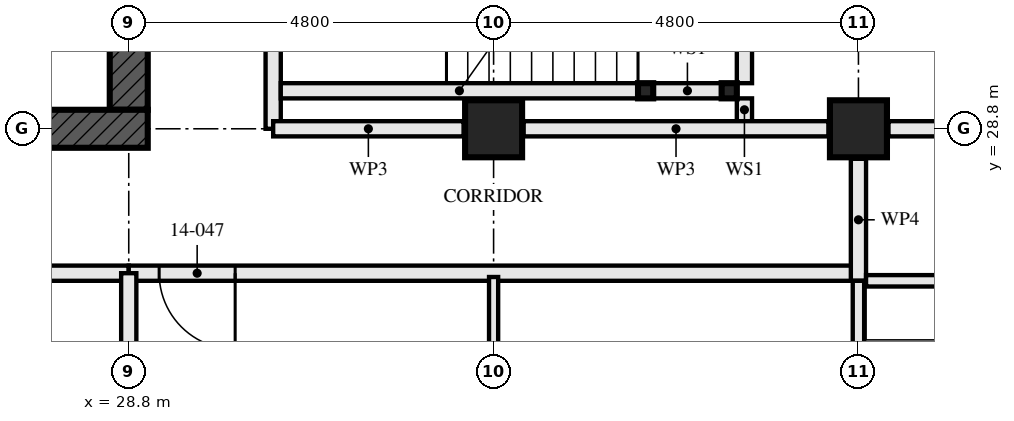
"""IFC4 building model, lengths in metres.
Left out: names, types, materials, properties, quantities, classifications, styles, units other than length and angle.
Written with IfcOpenShell. Run it as: python <this file> out.ifc"""

import sys

from ifc_helpers import new_model, si_unit, direction, frame, frame_2d, origin, origin_2d, place, context, subcontext, project, spatial, rectangle, hollow_rectangle, extrude, element, fill, save


model = new_model("IFC4")
c1 = context("Model", 3, precision=1e-05, world=origin(), true_north=direction((0.0, 1.0)))
c2 = subcontext(c1, "Body", "Model", "MODEL_VIEW")
j1 = project(units=[si_unit("LENGTHUNIT", "METRE"), si_unit("PLANEANGLEUNIT", "RADIAN")], contexts=[c1])
p1 = place(None, origin())
s1 = spatial("IfcSite", under=j1, at=p1, CompositionType="ELEMENT")
p2 = place(p1, origin())
s2 = spatial("IfcBuilding", under=s1, at=p2, CompositionType="ELEMENT")
p3 = place(p2, frame((0.0, 0.0, 55.0)))
s3 = spatial("IfcBuildingStorey", under=s2, at=p3, CompositionType="ELEMENT", Elevation=55.0)
for number, where, z_axis, x_axis in (
    (1, (33.6, 28.8, 0.0), (0.0, 0.0, 1.0), (0.0, 1.0, 0.0)),
    (2, (38.4, 28.8, 0.0), (0.0, 0.0, 1.0), (0.0, 1.0, 0.0)),
):
    element("IfcColumn", number, at=place(p3, frame(where, z_axis=z_axis, x_axis=x_axis)), inside=s3, PredefinedType="COLUMN", context=c2, shape_type="SweptSolid", body=[
        extrude(hollow_rectangle(XDim=0.75, YDim=0.75, WallThickness=0.08, at=origin_2d()), origin(), (0.0, 0.0, 1.0), 3.5),
    ])
p4 = place(p3, frame((14.15, 28.8, -0.17), z_axis=(0.0, 0.0, 1.0), x_axis=(1.0, 0.0, 0.0)))
e3 = element("IfcWall", 3, at=p4, inside=s3, PredefinedType="SHEAR", context=c2, shape_type="SweptSolid", body=[
    extrude(rectangle(XDim=14.9, YDim=0.5, at=frame_2d((7.45, 0.0))), origin(), (0.0, 0.0, 1.0), 3.5),
])
p5 = place(p4, frame((6.85, 0.0, 0.17)))
e4 = element("IfcOpeningElement", 4, at=p5, cuts=e3, PredefinedType="OPENING", context=c2, shape_type="SweptSolid", body=[
    extrude(rectangle(XDim=1.2, YDim=2.1, at=frame_2d((0.6, 1.05))), frame((0.0, 0.26, 0.0), z_axis=(0.0, -1.0, 0.0), x_axis=(1.0, 0.0, 0.0)), (0.0, 0.0, 1.0), 0.521),
])
p6 = place(p3, frame((28.8, 29.05, -0.17), z_axis=(0.0, 0.0, 1.0), x_axis=(0.0, 1.0, 0.0)))
e5 = element("IfcWall", 5, at=p6, inside=s3, PredefinedType="SHEAR", context=c2, shape_type="SweptSolid", body=[
    extrude(rectangle(XDim=13.9, YDim=0.5, at=frame_2d((6.95, 0.0))), origin(), (0.0, 0.0, 1.0), 3.5),
])
p7 = place(p6, frame((6.35, 0.0, 0.17)))
e6 = element("IfcOpeningElement", 6, at=p7, cuts=e5, PredefinedType="OPENING", context=c2, shape_type="SweptSolid", body=[
    extrude(rectangle(XDim=1.2, YDim=2.1, at=frame_2d((0.6, 1.05))), frame((0.0, 0.26, 0.0), z_axis=(0.0, -1.0, 0.0), x_axis=(1.0, 0.0, 0.0)), (0.0, 0.0, 1.0), 0.521),
])
for number, where, z_axis, x_axis in (
    (7, (36.7, 29.3, 0.0), (0.0, 0.0, 1.0), (1.0, 0.0, 0.0)),
    (8, (35.6, 29.3, 0.0), (0.0, 0.0, 1.0), (1.0, 0.0, 0.0)),
):
    element("IfcColumn", number, at=place(p3, frame(where, z_axis=z_axis, x_axis=x_axis)), inside=s3, PredefinedType="COLUMN", context=c2, shape_type="SweptSolid", body=[
        extrude(hollow_rectangle(XDim=0.2, YDim=0.2, WallThickness=0.008, at=origin_2d()), origin(), (0.0, 0.0, 1.0), 3.33),
    ])
p8 = place(p3, frame((14.4, 26.9, 0.0), z_axis=(0.0, 0.0, 1.0), x_axis=(1.0, 0.0, 0.0)))
e9 = element("IfcWall", 9, at=p8, inside=s3, PredefinedType="PARTITIONING", context=c2, shape_type="SweptSolid", body=[
    extrude(rectangle(XDim=14.4, YDim=0.2, at=frame_2d((7.2, 0.0))), origin(), (0.0, 0.0, 1.0), 2.55),
])
p9 = place(p8, frame((1.4, 0.0, 0.0)))
e10 = element("IfcOpeningElement", 10, at=p9, cuts=e9, PredefinedType="OPENING", context=c2, shape_type="SweptSolid", body=[
    extrude(rectangle(XDim=1.0, YDim=2.1, at=frame_2d((0.5, 1.05))), frame((0.0, 0.111, 0.0), z_axis=(0.0, -1.0, 0.0), x_axis=(1.0, 0.0, 0.0)), (0.0, 0.0, 1.0), 0.221),
])
p10 = place(p8, frame((3.65, 0.0, 0.0)))
e11 = element("IfcOpeningElement", 11, at=p10, cuts=e9, PredefinedType="OPENING", context=c2, shape_type="SweptSolid", body=[
    extrude(rectangle(XDim=0.9, YDim=2.1, at=frame_2d((0.45, 1.05))), frame((0.0, 0.111, 0.0), z_axis=(0.0, -1.0, 0.0), x_axis=(1.0, 0.0, 0.0)), (0.0, 0.0, 1.0), 0.221),
])
p11 = place(p8, frame((5.2, 0.0, 0.0)))
e12 = element("IfcOpeningElement", 12, at=p11, cuts=e9, PredefinedType="OPENING", context=c2, shape_type="SweptSolid", body=[
    extrude(rectangle(XDim=1.0, YDim=2.1, at=frame_2d((0.5, 1.05))), frame((0.0, 0.111, 0.0), z_axis=(0.0, -1.0, 0.0), x_axis=(1.0, 0.0, 0.0)), (0.0, 0.0, 1.0), 0.221),
])
p12 = place(p8, frame((10.0, 0.0, 0.0)))
e13 = element("IfcOpeningElement", 13, at=p12, cuts=e9, PredefinedType="OPENING", context=c2, shape_type="SweptSolid", body=[
    extrude(rectangle(XDim=1.0, YDim=2.1, at=frame_2d((0.5, 1.05))), frame((0.0, 0.111, 0.0), z_axis=(0.0, -1.0, 0.0), x_axis=(1.0, 0.0, 0.0)), (0.0, 0.0, 1.0), 0.221),
])
p13 = place(p3, frame((38.4, 23.8, 0.0), z_axis=(0.0, 0.0, 1.0), x_axis=(0.0, 1.0, 0.0)))
e14 = element("IfcWall", 14, at=p13, inside=s3, PredefinedType="PARTITIONING", context=c2, shape_type="SweptSolid", body=[
    extrude(rectangle(XDim=3.0, YDim=0.15, at=frame_2d((1.5, 0.0))), origin(), (0.0, 0.0, 1.0), 2.55),
])
p14 = place(p13, frame((1.05, 0.0, 0.0)))
e15 = element("IfcOpeningElement", 15, at=p14, cuts=e14, PredefinedType="OPENING", context=c2, shape_type="SweptSolid", body=[
    extrude(rectangle(XDim=0.9, YDim=2.1, at=frame_2d((0.45, 1.05))), frame((0.0, 0.085, 0.0), z_axis=(0.0, -1.0, 0.0), x_axis=(1.0, 0.0, 0.0)), (0.0, 0.0, 1.0), 0.171),
])
p15 = place(p3, frame((33.6, 18.6, 0.0), z_axis=(0.0, 0.0, 1.0), x_axis=(0.0, 1.0, 0.0)))
e16 = element("IfcWall", 16, at=p15, inside=s3, PredefinedType="PARTITIONING", context=c2, shape_type="SweptSolid", body=[
    extrude(rectangle(XDim=8.25, YDim=0.12, at=frame_2d((4.125, 0.0))), origin(), (0.0, 0.0, 1.0), 2.55),
])
p16 = place(p15, frame((5.15, 0.0, 0.0)))
e17 = element("IfcOpeningElement", 17, at=p16, cuts=e16, PredefinedType="OPENING", context=c2, shape_type="SweptSolid", body=[
    extrude(rectangle(XDim=0.9, YDim=2.1, at=frame_2d((0.45, 1.05))), frame((0.0, 0.071, 0.0), z_axis=(0.0, -1.0, 0.0), x_axis=(1.0, 0.0, 0.0)), (0.0, 0.0, 1.0), 0.141),
])
p17 = place(p3, frame((28.8, 26.9, 0.0), z_axis=(0.0, 0.0, 1.0), x_axis=(1.0, 0.0, 0.0)))
e18 = element("IfcWall", 18, at=p17, inside=s3, PredefinedType="PARTITIONING", context=c2, shape_type="SweptSolid", body=[
    extrude(rectangle(XDim=9.6, YDim=0.2, at=frame_2d((4.8, 0.0))), origin(), (0.0, 0.0, 1.0), 3.33),
])
p18 = place(p17, frame((0.4, 0.0, 0.0)))
e19 = element("IfcOpeningElement", 19, at=p18, cuts=e18, PredefinedType="OPENING", context=c2, shape_type="SweptSolid", body=[
    extrude(rectangle(XDim=1.0, YDim=2.1, at=frame_2d((0.5, 1.05))), frame((0.0, 0.111, 0.0), z_axis=(0.0, -1.0, 0.0), x_axis=(1.0, 0.0, 0.0)), (0.0, 0.0, 1.0), 0.221),
])
p19 = place(p3, frame((38.4, 26.8, 0.0), z_axis=(0.0, 0.0, 1.0), x_axis=(0.0, 1.0, 0.0)))
e20 = element("IfcWall", 20, at=p19, inside=s3, PredefinedType="PARTITIONING", context=c2, shape_type="SweptSolid", body=[
    extrude(rectangle(XDim=1.605, YDim=0.2, at=frame_2d((0.802, 0.0))), origin(), (0.0, 0.0, 1.0), 3.33),
])
p20 = place(p3, frame((36.6, 29.3, 0.0), z_axis=(0.0, 0.0, 1.0), x_axis=(-1.0, 0.0, 0.0)))
e21 = element("IfcWall", 21, at=p20, inside=s3, PredefinedType="SOLIDWALL", context=c2, shape_type="SweptSolid", body=[
    extrude(rectangle(XDim=0.9, YDim=0.2, at=frame_2d((0.45, 0.0))), origin(), (0.0, 0.0, 1.0), 2.99),
])
p21 = place(p3, frame((35.5, 29.3, 0.0), z_axis=(0.0, 0.0, 1.0), x_axis=(-1.0, 0.0, 0.0)))
e22 = element("IfcWall", 22, at=p21, inside=s3, PredefinedType="SOLIDWALL", context=c2, shape_type="SweptSolid", body=[
    extrude(rectangle(XDim=4.7, YDim=0.2, at=frame_2d((2.35, 0.0))), origin(), (0.0, 0.0, 1.0), 2.99),
])
p22 = place(p3, frame((36.9, 28.9, 0.0), z_axis=(0.0, 0.0, 1.0), x_axis=(0.0, 1.0, 0.0)))
e23 = element("IfcWall", 23, at=p22, inside=s3, PredefinedType="SOLIDWALL", context=c2, shape_type="SweptSolid", body=[
    extrude(rectangle(XDim=0.3, YDim=0.2, at=frame_2d((0.15, 0.0))), origin(), (0.0, 0.0, 1.0), 3.33),
])
p23 = place(p3, frame((36.9, 29.4, 0.0), z_axis=(0.0, 0.0, 1.0), x_axis=(0.0, 1.0, 0.0)))
e24 = element("IfcWall", 24, at=p23, inside=s3, PredefinedType="SOLIDWALL", context=c2, shape_type="SweptSolid", body=[
    extrude(rectangle(XDim=2.6, YDim=0.2, at=frame_2d((1.3, 0.0))), origin(), (0.0, 0.0, 1.0), 3.33),
])
p24 = place(p3, frame((30.7, 28.8, 0.0), z_axis=(0.0, 0.0, 1.0), x_axis=(0.0, 1.0, 0.0)))
e25 = element("IfcWall", 25, at=p24, inside=s3, PredefinedType="PARTITIONING", context=c2, shape_type="SweptSolid", body=[
    extrude(rectangle(XDim=14.4, YDim=0.2, at=frame_2d((7.2, 0.0))), origin(), (0.0, 0.0, 1.0), 2.55),
])
p25 = place(p24, frame((1.4, 0.0, 0.0)))
e26 = element("IfcOpeningElement", 26, at=p25, cuts=e25, PredefinedType="OPENING", context=c2, shape_type="SweptSolid", body=[
    extrude(rectangle(XDim=1.0, YDim=2.1, at=frame_2d((0.5, 1.05))), frame((0.0, 0.111, 0.0), z_axis=(0.0, -1.0, 0.0), x_axis=(1.0, 0.0, 0.0)), (0.0, 0.0, 1.0), 0.221),
])
p26 = place(p24, frame((4.1, 0.0, 0.0)))
e27 = element("IfcOpeningElement", 27, at=p26, cuts=e25, PredefinedType="OPENING", context=c2, shape_type="SweptSolid", body=[
    extrude(rectangle(XDim=1.0, YDim=2.1, at=frame_2d((0.5, 1.05))), frame((0.0, 0.111, 0.0), z_axis=(0.0, -1.0, 0.0), x_axis=(1.0, 0.0, 0.0)), (0.0, 0.0, 1.0), 0.221),
])
p27 = place(p24, frame((5.975, 0.0, 0.0)))
e28 = element("IfcOpeningElement", 28, at=p27, cuts=e25, PredefinedType="OPENING", context=c2, shape_type="SweptSolid", body=[
    extrude(rectangle(XDim=1.0, YDim=2.1, at=frame_2d((0.5, 1.05))), frame((0.0, 0.111, 0.0), z_axis=(0.0, -1.0, 0.0), x_axis=(1.0, 0.0, 0.0)), (0.0, 0.0, 1.0), 0.221),
])
p28 = place(p24, frame((10.0, 0.0, 0.0)))
e29 = element("IfcOpeningElement", 29, at=p28, cuts=e25, PredefinedType="OPENING", context=c2, shape_type="SweptSolid", body=[
    extrude(rectangle(XDim=1.0, YDim=2.1, at=frame_2d((0.5, 1.05))), frame((0.0, 0.111, 0.0), z_axis=(0.0, -1.0, 0.0), x_axis=(1.0, 0.0, 0.0)), (0.0, 0.0, 1.0), 0.221),
])
p29 = place(p3, frame((28.8, 24.395, 0.0), z_axis=(0.0, 0.0, 1.0), x_axis=(0.0, 1.0, 0.0)))
e30 = element("IfcWall", 30, at=p29, inside=s3, PredefinedType="PARTITIONING", context=c2, shape_type="SweptSolid", body=[
    extrude(rectangle(XDim=2.505, YDim=0.2, at=frame_2d((1.252, 0.0))), origin(), (0.0, 0.0, 1.0), 2.32),
])
p30 = place(p3, frame((42.88, 28.8, 0.0), z_axis=(0.0, 0.0, 1.0), x_axis=(-1.0, 0.0, 0.0)))
e31 = element("IfcWall", 31, at=p30, inside=s3, PredefinedType="PARTITIONING", context=c2, shape_type="SweptSolid", body=[
    extrude(rectangle(XDim=4.085, YDim=0.2, at=frame_2d((2.042, 0.0))), origin(), (0.0, 0.0, 1.0), 2.32),
])
p31 = place(p3, frame((38.005, 28.8, 0.0), z_axis=(0.0, 0.0, 1.0), x_axis=(-1.0, 0.0, 0.0)))
e32 = element("IfcWall", 32, at=p31, inside=s3, PredefinedType="PARTITIONING", context=c2, shape_type="SweptSolid", body=[
    extrude(rectangle(XDim=4.01, YDim=0.2, at=frame_2d((2.005, 0.0))), origin(), (0.0, 0.0, 1.0), 2.32),
])
p32 = place(p3, frame((33.205, 28.8, 0.0), z_axis=(0.0, 0.0, 1.0), x_axis=(-1.0, 0.0, 0.0)))
e33 = element("IfcWall", 33, at=p32, inside=s3, PredefinedType="PARTITIONING", context=c2, shape_type="SweptSolid", body=[
    extrude(rectangle(XDim=2.505, YDim=0.2, at=frame_2d((1.252, 0.0))), origin(), (0.0, 0.0, 1.0), 2.32),
])
p33 = place(p3, frame((38.5, 26.8, 0.0), z_axis=(0.0, 0.0, 1.0), x_axis=(1.0, 0.0, 0.0)))
e34 = element("IfcWall", 34, at=p33, inside=s3, PredefinedType="PARTITIONING", context=c2, shape_type="SweptSolid", body=[
    extrude(rectangle(XDim=5.13, YDim=0.15, at=frame_2d((2.565, 0.0))), origin(), (0.0, 0.0, 1.0), 2.32),
])
p34 = place(p18, frame((1.0, 0.0, 0.0), z_axis=(0.0, 0.0, 1.0), x_axis=(-1.0, 0.0, 0.0)))
e35 = element("IfcDoor", 35, at=p34, inside=s3, OperationType="SINGLE_SWING_RIGHT", PredefinedType="DOOR", context=c2, shape_type="SweptSolid", body=[
    extrude(rectangle(XDim=1.0, YDim=2.1, at=frame_2d((0.5, 1.05))), frame((0.0, 0.027, 0.0), z_axis=(0.0, -1.0, 0.0), x_axis=(1.0, 0.0, 0.0)), (0.0, 0.0, 1.0), 0.054),
])
fill(e19, e35)
save(model, sys.argv[1])
